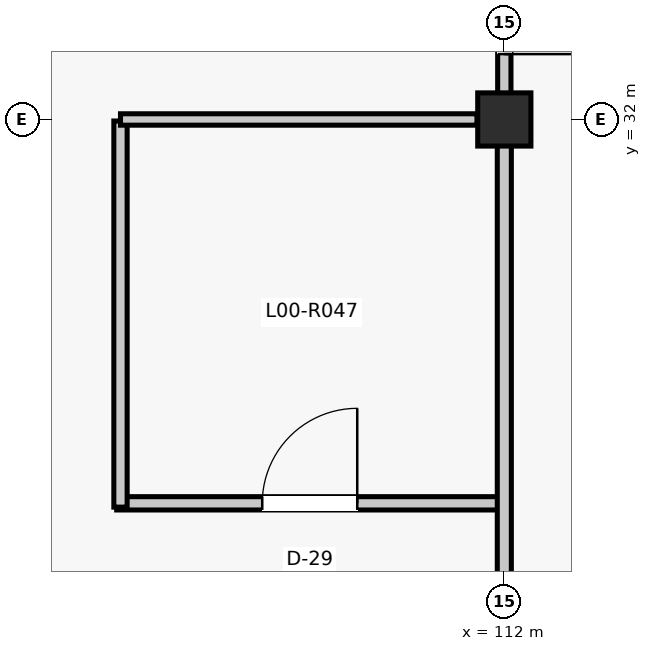
"""IFC4 building model, lengths in metres.
Left out: names, types, materials, properties, quantities, classifications, styles, units other than length and angle.
Written with IfcOpenShell. Run it as: python <this file> out.ifc"""

import sys

from ifc_helpers import new_model, si_unit, direction, frame, frame_2d, origin, origin_2d, place, context, subcontext, project, spatial, rectangle, extrude, element, fill, save


model = new_model("IFC4")
c1 = context("Model", 3, precision=1e-05, world=origin(), true_north=direction((0.0, 1.0)))
c2 = subcontext(c1, "Body", "Model", "MODEL_VIEW")
j1 = project(units=[si_unit("LENGTHUNIT", "METRE"), si_unit("PLANEANGLEUNIT", "RADIAN")], contexts=[c1])
p1 = place(None, origin())
s1 = spatial("IfcSite", under=j1, at=p1, CompositionType="ELEMENT")
p2 = place(p1, origin())
s2 = spatial("IfcBuilding", under=s1, at=p2, CompositionType="ELEMENT")
p3 = place(p2, origin())
s3 = spatial("IfcBuildingStorey", under=s2, at=p3, CompositionType="ELEMENT", Elevation=0.0)
p4 = place(p3, frame((112.0, 32.0, 0.0), z_axis=(0.0, 0.0, 1.0), x_axis=(1.0, 0.0, 0.0)))
e1 = element("IfcColumn", 1, at=p4, inside=s3, PredefinedType="COLUMN", context=c2, shape_type="SweptSolid", body=[
    extrude(rectangle(XDim=0.7, YDim=0.7, at=origin_2d()), origin(), (0.0, 0.0, 1.0), 5.28),
])
p5 = place(p3, frame((106.9, 26.95, 0.0), z_axis=(0.0, 0.0, 1.0), x_axis=(1.0, 0.0, 0.0)))
e2 = element("IfcWall", 2, at=p5, inside=s3, PredefinedType="PARTITIONING", context=c2, shape_type="SweptSolid", body=[
    extrude(rectangle(XDim=5.08, YDim=0.175, at=frame_2d((2.54, 0.0))), origin(), (0.0, 0.0, 1.0), 4.412),
])
p6 = place(p5, frame((1.915, 0.0, 0.0)))
e3 = element("IfcOpeningElement", 3, at=p6, cuts=e2, PredefinedType="OPENING", context=c2, shape_type="SweptSolid", body=[
    extrude(rectangle(XDim=1.25, YDim=2.18, at=frame_2d((0.625, 1.09))), frame((0.0, 0.097, 0.0), z_axis=(0.0, -1.0, 0.0), x_axis=(1.0, 0.0, 0.0)), (0.0, 0.0, 1.0), 0.195),
])
p7 = place(p3, frame((106.95, 26.9, 0.0), z_axis=(0.0, 0.0, 1.0), x_axis=(0.0, 1.0, 0.0)))
e4 = element("IfcWall", 4, at=p7, inside=s3, PredefinedType="PARTITIONING", context=c2, shape_type="SweptSolid", body=[
    extrude(rectangle(XDim=5.08, YDim=0.175, at=frame_2d((2.54, 0.0))), origin(), (0.0, 0.0, 1.0), 4.403),
])
p8 = place(p3, frame((106.95, 32.0, 0.0), z_axis=(0.0, 0.0, 1.0), x_axis=(1.0, 0.0, 0.0)))
e5 = element("IfcWall", 5, at=p8, inside=s3, PredefinedType="PARTITIONING", context=c2, shape_type="SweptSolid", body=[
    extrude(rectangle(XDim=4.69, YDim=0.15, at=frame_2d((2.345, 0.0))), origin(), (0.0, 0.0, 1.0), 4.403),
])
p9 = place(p3, frame((112.0, 24.34, 0.0), z_axis=(0.0, 0.0, 1.0), x_axis=(0.0, 1.0, 0.0)))
e6 = element("IfcWall", 6, at=p9, inside=s3, PredefinedType="PARTITIONING", context=c2, shape_type="SweptSolid", body=[
    extrude(rectangle(XDim=7.32, YDim=0.185, at=frame_2d((3.66, 0.0))), origin(), (0.0, 0.0, 1.0), 4.412),
])
p10 = place(p9, frame((0.52, 0.0, 0.0)))
e7 = element("IfcOpeningElement", 7, at=p10, cuts=e6, PredefinedType="OPENING", context=c2, shape_type="SweptSolid", body=[
    extrude(rectangle(XDim=0.94, YDim=2.12, at=frame_2d((0.47, 1.06))), frame((0.0, 0.103, 0.0), z_axis=(0.0, -1.0, 0.0), x_axis=(1.0, 0.0, 0.0)), (0.0, 0.0, 1.0), 0.205),
])
p11 = place(p3, frame((112.0, 32.34, 0.0), z_axis=(0.0, 0.0, 1.0), x_axis=(0.0, 1.0, 0.0)))
e8 = element("IfcWall", 8, at=p11, inside=s3, PredefinedType="PARTITIONING", context=c2, shape_type="SweptSolid", body=[
    extrude(rectangle(XDim=7.32, YDim=0.175, at=frame_2d((3.66, 0.0))), origin(), (0.0, 0.0, 1.0), 4.404),
])
p12 = place(p11, frame((0.52, 0.0, 0.0)))
e9 = element("IfcOpeningElement", 9, at=p12, cuts=e8, PredefinedType="OPENING", context=c2, shape_type="SweptSolid", body=[
    extrude(rectangle(XDim=0.94, YDim=2.12, at=frame_2d((0.47, 1.06))), frame((0.0, 0.097, 0.0), z_axis=(0.0, -1.0, 0.0), x_axis=(1.0, 0.0, 0.0)), (0.0, 0.0, 1.0), 0.195),
])
p13 = place(p6, origin())
e10 = element("IfcDoor", 10, at=p13, inside=s3, OperationType="SINGLE_SWING_RIGHT", PredefinedType="DOOR", context=c2, shape_type="SweptSolid", body=[
    extrude(rectangle(XDim=1.25, YDim=2.18, at=frame_2d((0.625, 1.09))), frame((0.0, 0.025, 0.0), z_axis=(0.0, -1.0, 0.0), x_axis=(1.0, 0.0, 0.0)), (0.0, 0.0, 1.0), 0.05),
])
fill(e3, e10)
p14 = place(p12, frame((0.94, 0.0, 0.0), z_axis=(0.0, 0.0, 1.0), x_axis=(-1.0, 0.0, 0.0)))
e11 = element("IfcDoor", 11, at=p14, inside=s3, OperationType="SINGLE_SWING_LEFT", PredefinedType="DOOR", context=c2, shape_type="SweptSolid", body=[
    extrude(rectangle(XDim=0.94, YDim=2.12, at=frame_2d((0.47, 1.06))), frame((0.0, 0.025, 0.0), z_axis=(0.0, -1.0, 0.0), x_axis=(1.0, 0.0, 0.0)), (0.0, 0.0, 1.0), 0.05),
])
fill(e9, e11)
save(model, sys.argv[1])
